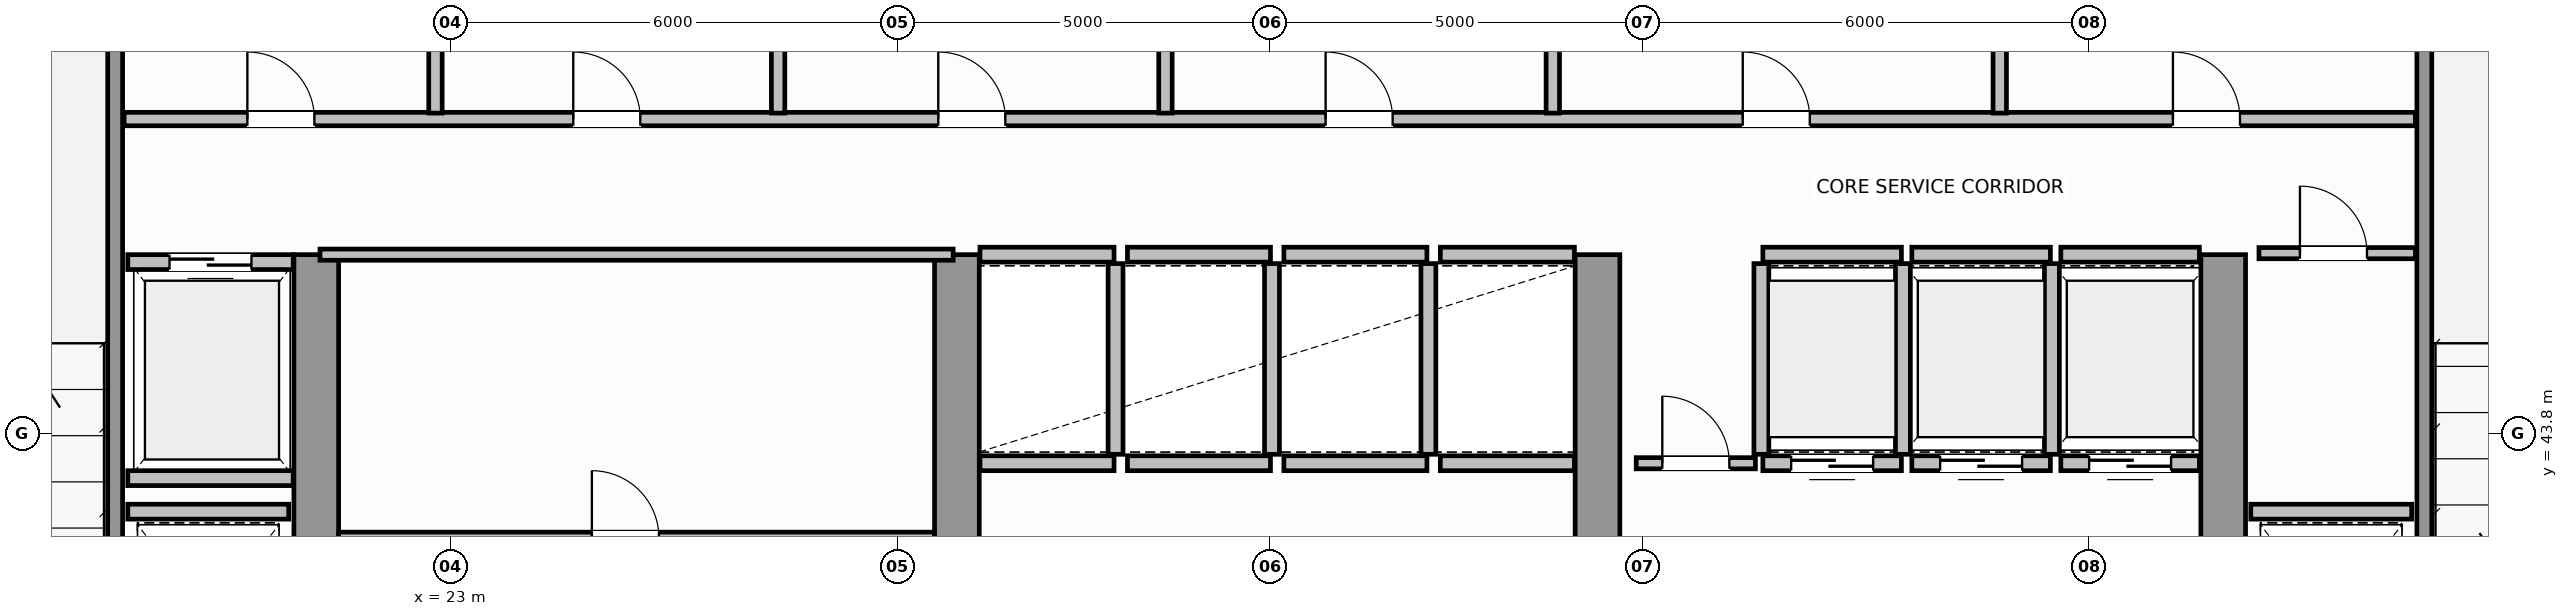
"""IFC4 building model, lengths in metres.
Left out: names, types, materials, properties, quantities, classifications, styles, units other than length and angle.
Written with IfcOpenShell. Run it as: python <this file> out.ifc"""

import sys

from ifc_helpers import new_model, si_unit, direction, frame, frame_2d, origin, place, context, subcontext, project, spatial, rectangle, extrude, source, transform, mapped, element, fill, save


model = new_model("IFC4")
c1 = context("Model", 3, precision=1e-05, world=origin(), true_north=direction((0.0, 1.0)))
c2 = subcontext(c1, "Body", "Model", "MODEL_VIEW")
j1 = project(units=[si_unit("LENGTHUNIT", "METRE"), si_unit("PLANEANGLEUNIT", "RADIAN")], contexts=[c1])
p1 = place(None, origin())
s1 = spatial("IfcSite", under=j1, at=p1, CompositionType="ELEMENT")
p2 = place(p1, origin())
s2 = spatial("IfcBuilding", under=s1, at=p2, CompositionType="ELEMENT")
p3 = place(p2, frame((0.0, 0.0, 203.2)))
s3 = spatial("IfcBuildingStorey", under=s2, at=p3, CompositionType="ELEMENT", Elevation=203.2)
for number, where, z_axis, x_axis in (
    (1, (21.2, 36.82, 0.0), (0.0, 0.0, 1.0), (0.0, 1.0, 0.0)),
    (2, (29.8, 36.82, 0.0), (0.0, 0.0, 1.0), (0.0, 1.0, 0.0)),
    (3, (38.4, 36.82, 0.0), (0.0, 0.0, 1.0), (0.0, 1.0, 0.0)),
    (4, (46.8, 36.82, 0.0), (0.0, 0.0, 1.0), (0.0, 1.0, 0.0)),
):
    element("IfcWall", number, at=place(p3, frame(where, z_axis=z_axis, x_axis=x_axis)), inside=s3, PredefinedType="SHEAR", context=c2, shape_type="SweptSolid", body=[
        extrude(rectangle(XDim=9.38, YDim=0.6, at=frame_2d((4.69, 0.0))), origin(), (0.0, 0.0, 1.0), 3.8),
    ])
for number, where, z_axis, x_axis in (
    (5, (18.5, 39.96, 0.0), (0.0, 0.0, 1.0), (0.0, 1.0, 0.0)),
    (6, (49.5, 39.96, 0.0), (0.0, 0.0, 1.0), (0.0, 1.0, 0.0)),
):
    element("IfcWall", number, at=place(p3, frame(where, z_axis=z_axis, x_axis=x_axis)), inside=s3, PredefinedType="SOLIDWALL", context=c2, shape_type="SweptSolid", body=[
        extrude(rectangle(XDim=9.93, YDim=0.2, at=frame_2d((4.965, 0.0))), origin(), (0.0, 0.0, 1.0), 3.8),
    ])
for number, where, z_axis, x_axis in (
    (7, (30.11, 43.4, 0.0), (0.0, 0.0, 1.0), (1.0, 0.0, 0.0)),
    (8, (30.11, 46.2, 0.0), (0.0, 0.0, 1.0), (1.0, 0.0, 0.0)),
):
    element("IfcWall", number, at=place(p3, frame(where, z_axis=z_axis, x_axis=x_axis)), inside=s3, PredefinedType="SOLIDWALL", context=c2, shape_type="SweptSolid", body=[
        extrude(rectangle(XDim=1.8, YDim=0.2, at=frame_2d((0.9, 0.0))), origin(), (0.0, 0.0, 1.0), 3.58),
    ])
p4 = place(p3, frame((31.93, 43.52, 0.0), z_axis=(0.0, 0.0, 1.0), x_axis=(0.0, 1.0, 0.0)))
e9 = element("IfcWall", 9, at=p4, inside=s3, PredefinedType="SOLIDWALL", context=c2, shape_type="SweptSolid", body=[
    extrude(rectangle(XDim=2.56, YDim=0.2, at=frame_2d((1.28, 0.0))), origin(), (0.0, 0.0, 1.0), 3.58),
])
for number, where, z_axis, x_axis in (
    (10, (32.09, 43.4, 0.0), (0.0, 0.0, 1.0), (1.0, 0.0, 0.0)),
    (11, (32.09, 46.2, 0.0), (0.0, 0.0, 1.0), (1.0, 0.0, 0.0)),
):
    element("IfcWall", number, at=place(p3, frame(where, z_axis=z_axis, x_axis=x_axis)), inside=s3, PredefinedType="SOLIDWALL", context=c2, shape_type="SweptSolid", body=[
        extrude(rectangle(XDim=1.92, YDim=0.2, at=frame_2d((0.96, 0.0))), origin(), (0.0, 0.0, 1.0), 3.58),
    ])
p5 = place(p3, frame((34.03, 43.52, 0.0), z_axis=(0.0, 0.0, 1.0), x_axis=(0.0, 1.0, 0.0)))
e12 = element("IfcWall", 12, at=p5, inside=s3, PredefinedType="SOLIDWALL", context=c2, shape_type="SweptSolid", body=[
    extrude(rectangle(XDim=2.56, YDim=0.2, at=frame_2d((1.28, 0.0))), origin(), (0.0, 0.0, 1.0), 3.58),
])
for number, where, z_axis, x_axis in (
    (13, (34.19, 43.4, 0.0), (0.0, 0.0, 1.0), (1.0, 0.0, 0.0)),
    (14, (34.19, 46.2, 0.0), (0.0, 0.0, 1.0), (1.0, 0.0, 0.0)),
):
    element("IfcWall", number, at=place(p3, frame(where, z_axis=z_axis, x_axis=x_axis)), inside=s3, PredefinedType="SOLIDWALL", context=c2, shape_type="SweptSolid", body=[
        extrude(rectangle(XDim=1.92, YDim=0.2, at=frame_2d((0.96, 0.0))), origin(), (0.0, 0.0, 1.0), 3.58),
    ])
p6 = place(p3, frame((36.13, 43.52, 0.0), z_axis=(0.0, 0.0, 1.0), x_axis=(0.0, 1.0, 0.0)))
e15 = element("IfcWall", 15, at=p6, inside=s3, PredefinedType="SOLIDWALL", context=c2, shape_type="SweptSolid", body=[
    extrude(rectangle(XDim=2.56, YDim=0.2, at=frame_2d((1.28, 0.0))), origin(), (0.0, 0.0, 1.0), 3.58),
])
for number, where, z_axis, x_axis in (
    (16, (36.29, 43.4, 0.0), (0.0, 0.0, 1.0), (1.0, 0.0, 0.0)),
    (17, (36.29, 46.2, 0.0), (0.0, 0.0, 1.0), (1.0, 0.0, 0.0)),
):
    element("IfcWall", number, at=place(p3, frame(where, z_axis=z_axis, x_axis=x_axis)), inside=s3, PredefinedType="SOLIDWALL", context=c2, shape_type="SweptSolid", body=[
        extrude(rectangle(XDim=1.8, YDim=0.2, at=frame_2d((0.9, 0.0))), origin(), (0.0, 0.0, 1.0), 3.58),
    ])
p7 = place(p3, frame((40.62, 43.4, 0.0), z_axis=(0.0, 0.0, 1.0), x_axis=(1.0, 0.0, 0.0)))
e18 = element("IfcWall", 18, at=p7, inside=s3, PredefinedType="SOLIDWALL", context=c2, shape_type="SweptSolid", body=[
    extrude(rectangle(XDim=1.86, YDim=0.2, at=frame_2d((0.93, 0.0))), origin(), (0.0, 0.0, 1.0), 3.58),
])
p8 = place(p7, frame((0.38, 0.0, 0.0)))
e19 = element("IfcOpeningElement", 19, at=p8, cuts=e18, PredefinedType="OPENING", context=c2, shape_type="SweptSolid", body=[
    extrude(rectangle(XDim=1.1, YDim=2.15, at=frame_2d((0.55, 1.075))), frame((0.0, 0.11, 0.0), z_axis=(0.0, -1.0, 0.0), x_axis=(1.0, 0.0, 0.0)), (0.0, 0.0, 1.0), 0.22),
])
p9 = place(p3, frame((40.62, 46.2, 0.0), z_axis=(0.0, 0.0, 1.0), x_axis=(1.0, 0.0, 0.0)))
e20 = element("IfcWall", 20, at=p9, inside=s3, PredefinedType="SOLIDWALL", context=c2, shape_type="SweptSolid", body=[
    extrude(rectangle(XDim=1.86, YDim=0.2, at=frame_2d((0.93, 0.0))), origin(), (0.0, 0.0, 1.0), 3.58),
])
for number, where, z_axis, x_axis in (
    (21, (40.6, 43.52, 0.0), (0.0, 0.0, 1.0), (0.0, 1.0, 0.0)),
    (22, (42.5, 43.52, 0.0), (0.0, 0.0, 1.0), (0.0, 1.0, 0.0)),
):
    element("IfcWall", number, at=place(p3, frame(where, z_axis=z_axis, x_axis=x_axis)), inside=s3, PredefinedType="SOLIDWALL", context=c2, shape_type="SweptSolid", body=[
        extrude(rectangle(XDim=2.56, YDim=0.2, at=frame_2d((1.28, 0.0))), origin(), (0.0, 0.0, 1.0), 3.58),
    ])
p10 = place(p3, frame((42.62, 43.4, 0.0), z_axis=(0.0, 0.0, 1.0), x_axis=(1.0, 0.0, 0.0)))
e23 = element("IfcWall", 23, at=p10, inside=s3, PredefinedType="SOLIDWALL", context=c2, shape_type="SweptSolid", body=[
    extrude(rectangle(XDim=1.86, YDim=0.2, at=frame_2d((0.93, 0.0))), origin(), (0.0, 0.0, 1.0), 3.58),
])
p11 = place(p10, frame((0.38, 0.0, 0.0)))
e24 = element("IfcOpeningElement", 24, at=p11, cuts=e23, PredefinedType="OPENING", context=c2, shape_type="SweptSolid", body=[
    extrude(rectangle(XDim=1.1, YDim=2.15, at=frame_2d((0.55, 1.075))), frame((0.0, 0.11, 0.0), z_axis=(0.0, -1.0, 0.0), x_axis=(1.0, 0.0, 0.0)), (0.0, 0.0, 1.0), 0.22),
])
p12 = place(p3, frame((42.62, 46.2, 0.0), z_axis=(0.0, 0.0, 1.0), x_axis=(1.0, 0.0, 0.0)))
e25 = element("IfcWall", 25, at=p12, inside=s3, PredefinedType="SOLIDWALL", context=c2, shape_type="SweptSolid", body=[
    extrude(rectangle(XDim=1.86, YDim=0.2, at=frame_2d((0.93, 0.0))), origin(), (0.0, 0.0, 1.0), 3.58),
])
p13 = place(p3, frame((44.5, 43.52, 0.0), z_axis=(0.0, 0.0, 1.0), x_axis=(0.0, 1.0, 0.0)))
e26 = element("IfcWall", 26, at=p13, inside=s3, PredefinedType="SOLIDWALL", context=c2, shape_type="SweptSolid", body=[
    extrude(rectangle(XDim=2.56, YDim=0.2, at=frame_2d((1.28, 0.0))), origin(), (0.0, 0.0, 1.0), 2.37),
])
p14 = place(p3, frame((44.62, 43.4, 0.0), z_axis=(0.0, 0.0, 1.0), x_axis=(1.0, 0.0, 0.0)))
e27 = element("IfcWall", 27, at=p14, inside=s3, PredefinedType="SOLIDWALL", context=c2, shape_type="SweptSolid", body=[
    extrude(rectangle(XDim=1.86, YDim=0.2, at=frame_2d((0.93, 0.0))), origin(), (0.0, 0.0, 1.0), 3.58),
])
p15 = place(p14, frame((0.38, 0.0, 0.0)))
e28 = element("IfcOpeningElement", 28, at=p15, cuts=e27, PredefinedType="OPENING", context=c2, shape_type="SweptSolid", body=[
    extrude(rectangle(XDim=1.1, YDim=2.15, at=frame_2d((0.55, 1.075))), frame((0.0, 0.11, 0.0), z_axis=(0.0, -1.0, 0.0), x_axis=(1.0, 0.0, 0.0)), (0.0, 0.0, 1.0), 0.22),
])
p16 = place(p3, frame((44.62, 46.2, 0.0), z_axis=(0.0, 0.0, 1.0), x_axis=(1.0, 0.0, 0.0)))
e29 = element("IfcWall", 29, at=p16, inside=s3, PredefinedType="SOLIDWALL", context=c2, shape_type="SweptSolid", body=[
    extrude(rectangle(XDim=1.86, YDim=0.2, at=frame_2d((0.93, 0.0))), origin(), (0.0, 0.0, 1.0), 3.58),
])
p17 = place(p3, frame((18.67, 46.1, 0.0), z_axis=(0.0, 0.0, 1.0), x_axis=(1.0, 0.0, 0.0)))
e30 = element("IfcWall", 30, at=p17, inside=s3, PredefinedType="SOLIDWALL", context=c2, shape_type="SweptSolid", body=[
    extrude(rectangle(XDim=2.22, YDim=0.2, at=frame_2d((1.11, 0.0))), origin(), (0.0, 0.0, 1.0), 3.58),
])
p18 = place(p17, frame((0.56, 0.0, 0.0)))
e31 = element("IfcOpeningElement", 31, at=p18, cuts=e30, PredefinedType="OPENING", context=c2, shape_type="SweptSolid", body=[
    extrude(rectangle(XDim=1.1, YDim=2.15, at=frame_2d((0.55, 1.075))), frame((0.0, 0.11, 0.0), z_axis=(0.0, -1.0, 0.0), x_axis=(1.0, 0.0, 0.0)), (0.0, 0.0, 1.0), 0.22),
])
p19 = place(p3, frame((18.67, 43.2, 0.0), z_axis=(0.0, 0.0, 1.0), x_axis=(1.0, 0.0, 0.0)))
e32 = element("IfcWall", 32, at=p19, inside=s3, PredefinedType="SOLIDWALL", context=c2, shape_type="SweptSolid", body=[
    extrude(rectangle(XDim=2.22, YDim=0.2, at=frame_2d((1.11, 0.0))), origin(), (0.0, 0.0, 1.0), 3.58),
])
for number, where, z_axis, x_axis in (
    (33, (18.67, 42.75, 0.0), (0.0, 0.0, 1.0), (1.0, 0.0, 0.0)),
    (34, (47.17, 42.75, 0.0), (0.0, 0.0, 1.0), (1.0, 0.0, 0.0)),
):
    element("IfcWall", number, at=place(p3, frame(where, z_axis=z_axis, x_axis=x_axis)), inside=s3, PredefinedType="SOLIDWALL", context=c2, shape_type="SweptSolid", body=[
        extrude(rectangle(XDim=2.16, YDim=0.2, at=frame_2d((1.08, 0.0))), origin(), (0.0, 0.0, 1.0), 3.58),
    ])
p20 = place(p3, frame((21.25, 46.2, 0.0), z_axis=(0.0, 0.0, 1.0), x_axis=(1.0, 0.0, 0.0)))
e35 = element("IfcWall", 35, at=p20, inside=s3, PredefinedType="PARTITIONING", context=c2, shape_type="SweptSolid", body=[
    extrude(rectangle(XDim=8.5, YDim=0.15, at=frame_2d((4.25, 0.0))), origin(), (0.0, 0.0, 1.0), 3.58),
])
p21 = place(p3, frame((21.5, 42.4, 0.0), z_axis=(0.0, 0.0, 1.0), x_axis=(1.0, 0.0, 0.0)))
e36 = element("IfcWall", 36, at=p21, inside=s3, PredefinedType="PARTITIONING", context=c2, shape_type="SweptSolid", body=[
    extrude(rectangle(XDim=8.0, YDim=0.15, at=frame_2d((4.0, 0.0))), origin(), (0.0, 0.0, 1.0), 3.58),
])
p22 = place(p21, frame((3.4, 0.0, 0.0)))
e37 = element("IfcOpeningElement", 37, at=p22, cuts=e36, PredefinedType="OPENING", context=c2, shape_type="SweptSolid", body=[
    extrude(rectangle(XDim=0.9, YDim=2.1, at=frame_2d((0.45, 1.05))), frame((0.0, 0.085, 0.0), z_axis=(0.0, -1.0, 0.0), x_axis=(1.0, 0.0, 0.0)), (0.0, 0.0, 1.0), 0.17),
])
p23 = place(p3, frame((47.28, 46.22, 0.0), z_axis=(0.0, 0.0, 1.0), x_axis=(1.0, 0.0, 0.0)))
e38 = element("IfcWall", 38, at=p23, inside=s3, PredefinedType="PARTITIONING", context=c2, shape_type="SweptSolid", body=[
    extrude(rectangle(XDim=2.1, YDim=0.15, at=frame_2d((1.05, 0.0))), origin(), (0.0, 0.0, 1.0), 3.58),
])
p24 = place(p23, frame((0.55, 0.0, 0.0)))
e39 = element("IfcOpeningElement", 39, at=p24, cuts=e38, PredefinedType="OPENING", context=c2, shape_type="SweptSolid", body=[
    extrude(rectangle(XDim=0.9, YDim=2.1, at=frame_2d((0.45, 1.05))), frame((0.0, 0.085, 0.0), z_axis=(0.0, -1.0, 0.0), x_axis=(1.0, 0.0, 0.0)), (0.0, 0.0, 1.0), 0.17),
])
p25 = place(p3, frame((38.92, 43.4, 0.0), z_axis=(0.0, 0.0, 1.0), x_axis=(1.0, 0.0, 0.0)))
e40 = element("IfcWall", 40, at=p25, inside=s3, PredefinedType="PARTITIONING", context=c2, shape_type="SweptSolid", body=[
    extrude(rectangle(XDim=1.6, YDim=0.15, at=frame_2d((0.8, 0.0))), origin(), (0.0, 0.0, 1.0), 3.58),
])
p26 = place(p25, frame((0.35, 0.0, 0.0)))
e41 = element("IfcOpeningElement", 41, at=p26, cuts=e40, PredefinedType="OPENING", context=c2, shape_type="SweptSolid", body=[
    extrude(rectangle(XDim=0.9, YDim=2.1, at=frame_2d((0.45, 1.05))), frame((0.0, 0.085, 0.0), z_axis=(0.0, -1.0, 0.0), x_axis=(1.0, 0.0, 0.0)), (0.0, 0.0, 1.0), 0.17),
])
p27 = place(p3, frame((18.62, 48.02, 0.0), z_axis=(0.0, 0.0, 1.0), x_axis=(1.0, 0.0, 0.0)))
e42 = element("IfcWall", 42, at=p27, inside=s3, PredefinedType="PLUMBINGWALL", context=c2, shape_type="SweptSolid", body=[
    extrude(rectangle(XDim=30.76, YDim=0.18, at=frame_2d((15.38, 0.0))), origin(), (0.0, 0.0, 1.0), 3.58),
])
p28 = place(p27, frame((1.655, 0.0, 0.0)))
e43 = element("IfcOpeningElement", 43, at=p28, cuts=e42, PredefinedType="OPENING", context=c2, shape_type="SweptSolid", body=[
    extrude(rectangle(XDim=0.9, YDim=2.15, at=frame_2d((0.45, 1.075))), frame((0.0, 0.1, 0.0), z_axis=(0.0, -1.0, 0.0), x_axis=(1.0, 0.0, 0.0)), (0.0, 0.0, 1.0), 0.2),
])
p29 = place(p27, frame((6.03, 0.0, 0.0)))
e44 = element("IfcOpeningElement", 44, at=p29, cuts=e42, PredefinedType="OPENING", context=c2, shape_type="SweptSolid", body=[
    extrude(rectangle(XDim=0.9, YDim=2.15, at=frame_2d((0.45, 1.075))), frame((0.0, 0.1, 0.0), z_axis=(0.0, -1.0, 0.0), x_axis=(1.0, 0.0, 0.0)), (0.0, 0.0, 1.0), 0.2),
])
p30 = place(p27, frame((10.93, 0.0, 0.0)))
e45 = element("IfcOpeningElement", 45, at=p30, cuts=e42, PredefinedType="OPENING", context=c2, shape_type="SweptSolid", body=[
    extrude(rectangle(XDim=0.9, YDim=2.15, at=frame_2d((0.45, 1.075))), frame((0.0, 0.1, 0.0), z_axis=(0.0, -1.0, 0.0), x_axis=(1.0, 0.0, 0.0)), (0.0, 0.0, 1.0), 0.2),
])
p31 = place(p27, frame((16.13, 0.0, 0.0)))
e46 = element("IfcOpeningElement", 46, at=p31, cuts=e42, PredefinedType="OPENING", context=c2, shape_type="SweptSolid", body=[
    extrude(rectangle(XDim=0.9, YDim=2.15, at=frame_2d((0.45, 1.075))), frame((0.0, 0.1, 0.0), z_axis=(0.0, -1.0, 0.0), x_axis=(1.0, 0.0, 0.0)), (0.0, 0.0, 1.0), 0.2),
])
p32 = place(p27, frame((21.73, 0.0, 0.0)))
e47 = element("IfcOpeningElement", 47, at=p32, cuts=e42, PredefinedType="OPENING", context=c2, shape_type="SweptSolid", body=[
    extrude(rectangle(XDim=0.9, YDim=2.15, at=frame_2d((0.45, 1.075))), frame((0.0, 0.1, 0.0), z_axis=(0.0, -1.0, 0.0), x_axis=(1.0, 0.0, 0.0)), (0.0, 0.0, 1.0), 0.2),
])
p33 = place(p27, frame((27.505, 0.0, 0.0)))
e48 = element("IfcOpeningElement", 48, at=p33, cuts=e42, PredefinedType="OPENING", context=c2, shape_type="SweptSolid", body=[
    extrude(rectangle(XDim=0.9, YDim=2.15, at=frame_2d((0.45, 1.075))), frame((0.0, 0.1, 0.0), z_axis=(0.0, -1.0, 0.0), x_axis=(1.0, 0.0, 0.0)), (0.0, 0.0, 1.0), 0.2),
])
p34 = place(p3, frame((22.8, 48.1, 0.0), z_axis=(0.0, 0.0, 1.0), x_axis=(0.0, 1.0, 0.0)))
e49 = element("IfcWall", 49, at=p34, inside=s3, PredefinedType="PLUMBINGWALL", context=c2, shape_type="SweptSolid", body=[
    extrude(rectangle(XDim=2.28, YDim=0.18, at=frame_2d((1.14, 0.0))), origin(), (0.0, 0.0, 1.0), 2.37),
])
for number, where, z_axis, x_axis in (
    (50, (27.4, 48.1, 0.0), (0.0, 0.0, 1.0), (0.0, 1.0, 0.0)),
    (51, (32.6, 48.1, 0.0), (0.0, 0.0, 1.0), (0.0, 1.0, 0.0)),
    (52, (37.8, 48.1, 0.0), (0.0, 0.0, 1.0), (0.0, 1.0, 0.0)),
    (53, (43.8, 48.1, 0.0), (0.0, 0.0, 1.0), (0.0, 1.0, 0.0)),
):
    element("IfcWall", number, at=place(p3, frame(where, z_axis=z_axis, x_axis=x_axis)), inside=s3, PredefinedType="PLUMBINGWALL", context=c2, shape_type="SweptSolid", body=[
        extrude(rectangle(XDim=2.28, YDim=0.18, at=frame_2d((1.14, 0.0))), origin(), (0.0, 0.0, 1.0), 3.58),
    ])
m1 = source(origin(), c2, "Body", "SweptSolid", [
    extrude(rectangle(XDim=1.1, YDim=2.15, at=frame_2d((0.55, 1.075))), frame((0.0, 0.025, 0.0), z_axis=(0.0, -1.0, 0.0), x_axis=(1.0, 0.0, 0.0)), (0.0, 0.0, 1.0), 0.05),
])
p35 = place(p8, origin())
e54 = element("IfcDoor", 54, at=p35, inside=s3, OperationType="DOUBLE_DOOR_SLIDING", PredefinedType="DOOR", context=c2, shape_type="MappedRepresentation", body=[
    mapped(m1, transform((0.0, 0.0, 0.0), scale=1.0)),
])
fill(e19, e54)
p36 = place(p11, origin())
e55 = element("IfcDoor", 55, at=p36, inside=s3, OperationType="DOUBLE_DOOR_SLIDING", PredefinedType="DOOR", context=c2, shape_type="MappedRepresentation", body=[
    mapped(m1, transform((0.0, 0.0, 0.0), scale=1.0)),
])
fill(e24, e55)
p37 = place(p15, origin())
e56 = element("IfcDoor", 56, at=p37, inside=s3, OperationType="DOUBLE_DOOR_SLIDING", PredefinedType="DOOR", context=c2, shape_type="MappedRepresentation", body=[
    mapped(m1, transform((0.0, 0.0, 0.0), scale=1.0)),
])
fill(e28, e56)
p38 = place(p18, origin())
e57 = element("IfcDoor", 57, at=p38, inside=s3, OperationType="DOUBLE_DOOR_SLIDING", PredefinedType="DOOR", context=c2, shape_type="MappedRepresentation", body=[
    mapped(m1, transform((0.0, 0.0, 0.0), scale=1.0)),
])
fill(e31, e57)
m2 = source(origin(), c2, "Body", "SweptSolid", [
    extrude(rectangle(XDim=0.9, YDim=2.1, at=frame_2d((0.45, 1.05))), frame((0.0, 0.025, 0.0), z_axis=(0.0, -1.0, 0.0), x_axis=(1.0, 0.0, 0.0)), (0.0, 0.0, 1.0), 0.05),
])
p39 = place(p22, origin())
e58 = element("IfcDoor", 58, at=p39, inside=s3, OperationType="SINGLE_SWING_RIGHT", PredefinedType="DOOR", context=c2, shape_type="MappedRepresentation", body=[
    mapped(m2, transform((0.0, 0.0, 0.0), scale=1.0)),
])
fill(e37, e58)
p40 = place(p24, origin())
e59 = element("IfcDoor", 59, at=p40, inside=s3, OperationType="SINGLE_SWING_RIGHT", PredefinedType="DOOR", context=c2, shape_type="MappedRepresentation", body=[
    mapped(m2, transform((0.0, 0.0, 0.0), scale=1.0)),
])
fill(e39, e59)
p41 = place(p26, origin())
e60 = element("IfcDoor", 60, at=p41, inside=s3, OperationType="SINGLE_SWING_LEFT", PredefinedType="DOOR", context=c2, shape_type="MappedRepresentation", body=[
    mapped(m2, transform((0.0, 0.0, 0.0), scale=1.0)),
])
fill(e41, e60)
m3 = source(origin(), c2, "Body", "SweptSolid", [
    extrude(rectangle(XDim=0.9, YDim=2.15, at=frame_2d((0.45, 1.075))), frame((0.0, 0.025, 0.0), z_axis=(0.0, -1.0, 0.0), x_axis=(1.0, 0.0, 0.0)), (0.0, 0.0, 1.0), 0.05),
])
p42 = place(p28, origin())
e61 = element("IfcDoor", 61, at=p42, inside=s3, OperationType="SINGLE_SWING_LEFT", PredefinedType="DOOR", context=c2, shape_type="MappedRepresentation", body=[
    mapped(m3, transform((0.0, 0.0, 0.0), scale=1.0)),
])
fill(e43, e61)
p43 = place(p29, origin())
e62 = element("IfcDoor", 62, at=p43, inside=s3, OperationType="SINGLE_SWING_RIGHT", PredefinedType="DOOR", context=c2, shape_type="MappedRepresentation", body=[
    mapped(m3, transform((0.0, 0.0, 0.0), scale=1.0)),
])
fill(e44, e62)
p44 = place(p30, origin())
e63 = element("IfcDoor", 63, at=p44, inside=s3, OperationType="SINGLE_SWING_LEFT", PredefinedType="DOOR", context=c2, shape_type="MappedRepresentation", body=[
    mapped(m3, transform((0.0, 0.0, 0.0), scale=1.0)),
])
fill(e45, e63)
p45 = place(p31, origin())
e64 = element("IfcDoor", 64, at=p45, inside=s3, OperationType="SINGLE_SWING_RIGHT", PredefinedType="DOOR", context=c2, shape_type="MappedRepresentation", body=[
    mapped(m3, transform((0.0, 0.0, 0.0), scale=1.0)),
])
fill(e46, e64)
p46 = place(p32, origin())
e65 = element("IfcDoor", 65, at=p46, inside=s3, OperationType="SINGLE_SWING_LEFT", PredefinedType="DOOR", context=c2, shape_type="MappedRepresentation", body=[
    mapped(m3, transform((0.0, 0.0, 0.0), scale=1.0)),
])
fill(e47, e65)
p47 = place(p33, origin())
e66 = element("IfcDoor", 66, at=p47, inside=s3, OperationType="SINGLE_SWING_RIGHT", PredefinedType="DOOR", context=c2, shape_type="MappedRepresentation", body=[
    mapped(m3, transform((0.0, 0.0, 0.0), scale=1.0)),
])
fill(e48, e66)
save(model, sys.argv[1])
